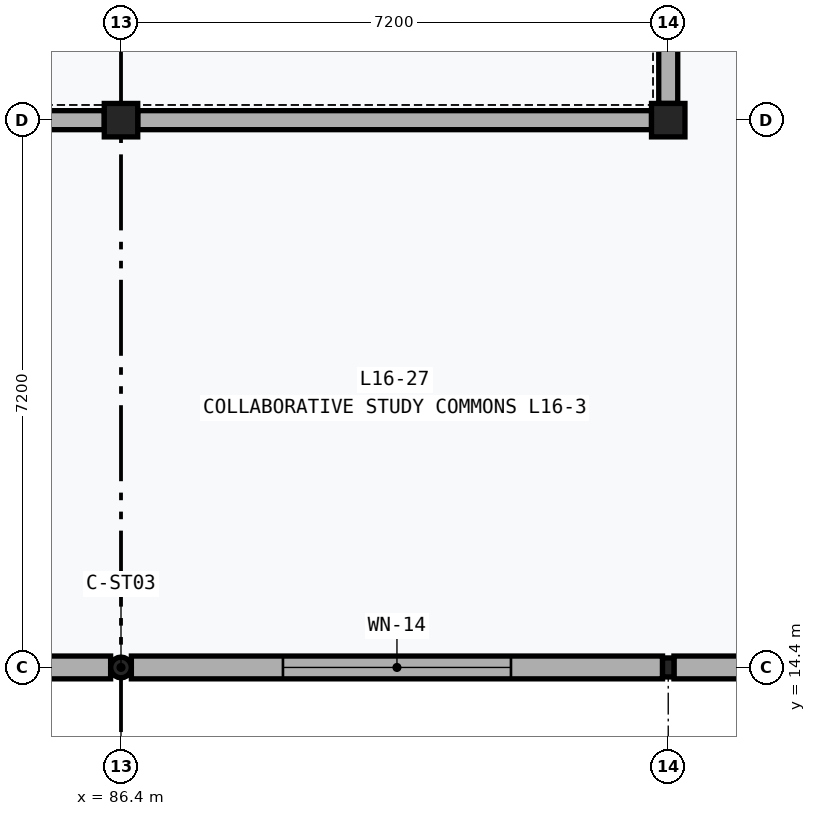
"""IFC4 building model, lengths in metres.
Left out: names, types, materials, properties, quantities, classifications, styles, units other than length and angle.
Written with IfcOpenShell. Run it as: python <this file> out.ifc"""

import sys

from ifc_helpers import new_model, si_unit, direction, frame, frame_2d, origin, origin_2d, place, context, subcontext, project, spatial, rectangle, hollow_rectangle, hollow_circle, extrude, element, fill, save


model = new_model("IFC4")
c1 = context("Model", 3, precision=1e-05, world=origin(), true_north=direction((0.0, 1.0)))
c2 = subcontext(c1, "Body", "Model", "MODEL_VIEW")
j1 = project(units=[si_unit("LENGTHUNIT", "METRE"), si_unit("PLANEANGLEUNIT", "RADIAN")], contexts=[c1])
p1 = place(None, origin())
s1 = spatial("IfcSite", under=j1, at=p1, CompositionType="ELEMENT")
p2 = place(p1, origin())
s2 = spatial("IfcBuilding", under=s1, at=p2, CompositionType="ELEMENT")
p3 = place(p2, frame((0.0, 0.0, 67.2)))
s3 = spatial("IfcBuildingStorey", under=s2, at=p3, CompositionType="ELEMENT", Elevation=67.2)
p4 = place(p3, frame((86.4, 14.4, 0.0), z_axis=(0.0, 0.0, 1.0), x_axis=(1.0, 0.0, 0.0)))
e1 = element("IfcColumn", 1, at=p4, inside=s3, PredefinedType="COLUMN", context=c2, shape_type="SweptSolid", body=[
    extrude(hollow_circle(Radius=0.136, WallThickness=0.012, at=origin_2d()), origin(), (0.0, 0.0, 1.0), 4.8),
])
p5 = place(p3, frame((86.4, 21.6, 0.0), z_axis=(0.0, 0.0, 1.0), x_axis=(1.0, 0.0, 0.0)))
e2 = element("IfcColumn", 2, at=p5, inside=s3, PredefinedType="COLUMN", context=c2, shape_type="SweptSolid", body=[
    extrude(rectangle(XDim=0.44, YDim=0.44, at=origin_2d()), origin(), (0.0, 0.0, 1.0), 4.8),
])
p6 = place(p3, frame((93.6, 14.4, 0.0), z_axis=(0.0, 0.0, 1.0), x_axis=(1.0, 0.0, 0.0)))
e3 = element("IfcColumn", 3, at=p6, inside=s3, PredefinedType="COLUMN", context=c2, shape_type="SweptSolid", body=[
    extrude(hollow_rectangle(XDim=0.15, YDim=0.25, WallThickness=0.01, at=origin_2d()), origin(), (0.0, 0.0, 1.0), 4.8),
])
p7 = place(p3, frame((93.6, 21.6, 0.0), z_axis=(0.0, 0.0, 1.0), x_axis=(1.0, 0.0, 0.0)))
e4 = element("IfcColumn", 4, at=p7, inside=s3, PredefinedType="COLUMN", context=c2, shape_type="SweptSolid", body=[
    extrude(rectangle(XDim=0.44, YDim=0.44, at=origin_2d()), origin(), (0.0, 0.0, 1.0), 4.8),
])
p8 = place(p3, frame((79.275, 14.4, 0.0), z_axis=(0.0, 0.0, 1.0), x_axis=(1.0, 0.0, 0.0)))
e5 = element("IfcWall", 5, at=p8, inside=s3, PredefinedType="SOLIDWALL", context=c2, shape_type="SweptSolid", body=[
    extrude(rectangle(XDim=6.989, YDim=0.3, at=frame_2d((3.494, 0.0))), origin(), (0.0, 0.0, 1.0), 4.16),
])
p9 = place(p8, frame((2.144, 0.0, 0.85)))
e6 = element("IfcOpeningElement", 6, at=p9, cuts=e5, PredefinedType="OPENING", context=c2, shape_type="SweptSolid", body=[
    extrude(rectangle(XDim=2.7, YDim=2.0, at=frame_2d((1.35, 1.0))), frame((0.0, 0.162, 0.0), z_axis=(0.0, -1.0, 0.0), x_axis=(1.0, 0.0, 0.0)), (0.0, 0.0, 1.0), 0.324),
])
p10 = place(p3, frame((86.537, 14.4, 0.0), z_axis=(0.0, 0.0, 1.0), x_axis=(1.0, 0.0, 0.0)))
e7 = element("IfcWall", 7, at=p10, inside=s3, PredefinedType="SOLIDWALL", context=c2, shape_type="SweptSolid", body=[
    extrude(rectangle(XDim=6.988, YDim=0.3, at=frame_2d((3.494, 0.0))), origin(), (0.0, 0.0, 1.0), 4.16),
])
p11 = place(p10, frame((1.994, 0.0, 0.85)))
e8 = element("IfcOpeningElement", 8, at=p11, cuts=e7, PredefinedType="OPENING", context=c2, shape_type="SweptSolid", body=[
    extrude(rectangle(XDim=3.0, YDim=2.0, at=frame_2d((1.5, 1.0))), frame((0.0, 0.162, 0.0), z_axis=(0.0, -1.0, 0.0), x_axis=(1.0, 0.0, 0.0)), (0.0, 0.0, 1.0), 0.324),
])
p12 = place(p3, frame((93.675, 14.4, 0.0), z_axis=(0.0, 0.0, 1.0), x_axis=(1.0, 0.0, 0.0)))
e9 = element("IfcWall", 9, at=p12, inside=s3, PredefinedType="SOLIDWALL", context=c2, shape_type="SweptSolid", body=[
    extrude(rectangle(XDim=6.989, YDim=0.3, at=frame_2d((3.494, 0.0))), origin(), (0.0, 0.0, 1.0), 4.16),
])
p13 = place(p12, frame((1.844, 0.0, 0.85)))
e10 = element("IfcOpeningElement", 10, at=p13, cuts=e9, PredefinedType="OPENING", context=c2, shape_type="SweptSolid", body=[
    extrude(rectangle(XDim=3.3, YDim=2.0, at=frame_2d((1.65, 1.0))), frame((0.0, 0.162, 0.0), z_axis=(0.0, -1.0, 0.0), x_axis=(1.0, 0.0, 0.0)), (0.0, 0.0, 1.0), 0.324),
])
p14 = place(p3, frame((79.42, 21.6, 0.0), z_axis=(0.0, 0.0, 1.0), x_axis=(1.0, 0.0, 0.0)))
e11 = element("IfcWall", 11, at=p14, inside=s3, PredefinedType="PARTITIONING", context=c2, shape_type="SweptSolid", body=[
    extrude(rectangle(XDim=6.76, YDim=0.25, at=frame_2d((3.38, 0.0))), origin(), (0.0, 0.0, 1.0), 4.2),
])
p15 = place(p14, frame((2.43, 0.0, 0.0)))
e12 = element("IfcOpeningElement", 12, at=p15, cuts=e11, PredefinedType="OPENING", context=c2, shape_type="SweptSolid", body=[
    extrude(rectangle(XDim=1.9, YDim=2.35, at=frame_2d((0.95, 1.175))), frame((0.0, 0.137, 0.0), z_axis=(0.0, -1.0, 0.0), x_axis=(1.0, 0.0, 0.0)), (0.0, 0.0, 1.0), 0.274),
])
p16 = place(p3, frame((86.62, 21.6, 0.0), z_axis=(0.0, 0.0, 1.0), x_axis=(1.0, 0.0, 0.0)))
e13 = element("IfcWall", 13, at=p16, inside=s3, PredefinedType="PARTITIONING", context=c2, shape_type="SweptSolid", body=[
    extrude(rectangle(XDim=6.76, YDim=0.25, at=frame_2d((3.38, 0.0))), origin(), (0.0, 0.0, 1.0), 4.2),
])
p17 = place(p3, frame((93.6, 21.82, 0.0), z_axis=(0.0, 0.0, 1.0), x_axis=(0.0, 1.0, 0.0)))
e14 = element("IfcWall", 14, at=p17, inside=s3, PredefinedType="PARTITIONING", context=c2, shape_type="SweptSolid", body=[
    extrude(rectangle(XDim=6.76, YDim=0.25, at=frame_2d((3.38, 0.0))), origin(), (0.0, 0.0, 1.0), 4.26),
])
p18 = place(p11, origin())
e15 = element("IfcWindow", 15, at=p18, inside=s3, PartitioningType="SINGLE_PANEL", PredefinedType="WINDOW", context=c2, shape_type="SweptSolid", body=[
    extrude(rectangle(XDim=3.0, YDim=2.0, at=frame_2d((1.5, 1.0))), frame((0.0, 0.03, 0.0), z_axis=(0.0, -1.0, 0.0), x_axis=(1.0, 0.0, 0.0)), (0.0, 0.0, 1.0), 0.06),
])
fill(e8, e15)
save(model, sys.argv[1])
